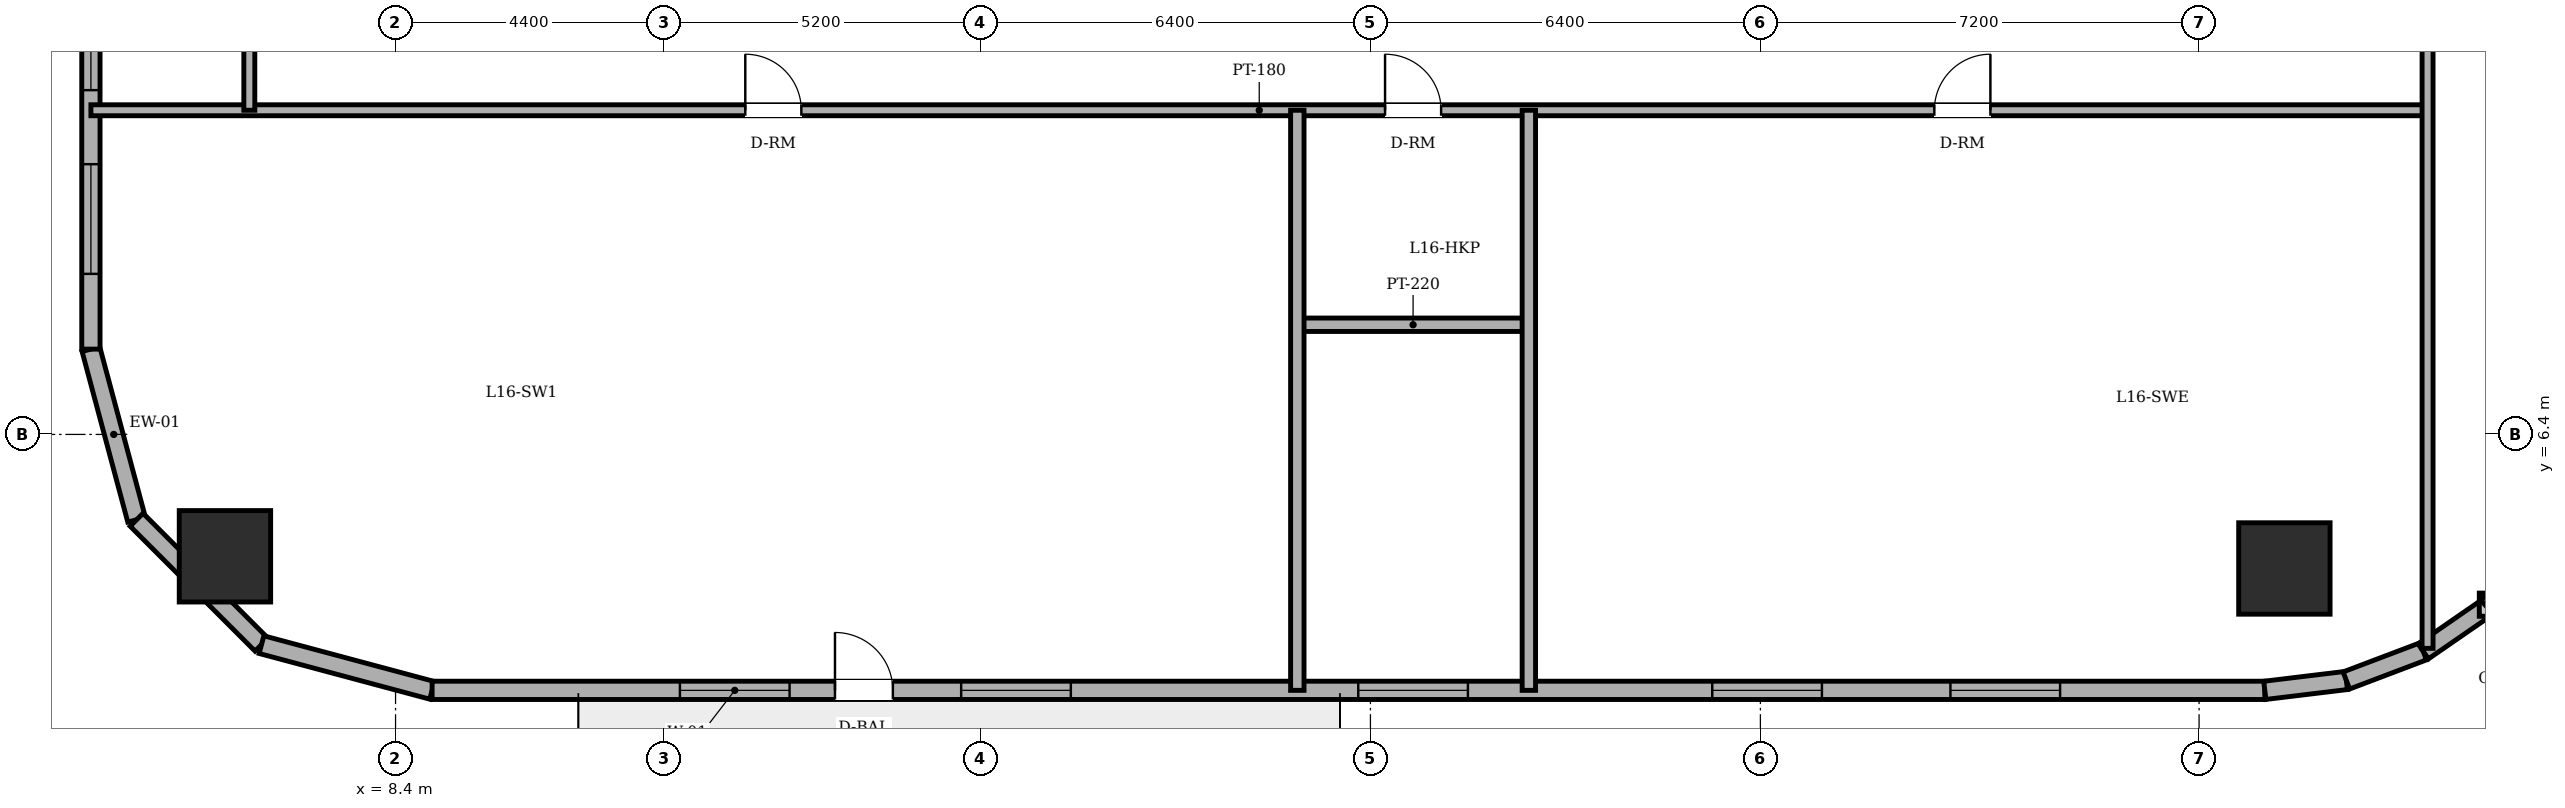
"""IFC4 building model, lengths in metres.
Left out: names, types, materials, properties, quantities, classifications, styles, units other than length and angle.
Written with IfcOpenShell. Run it as: python <this file> out.ifc"""

import sys

from ifc_helpers import new_model, si_unit, direction, frame, frame_2d, origin, origin_2d, place, context, subcontext, project, spatial, rectangle, circle, extrude, element, fill, save


model = new_model("IFC4")
c1 = context("Model", 3, precision=1e-05, world=origin(), true_north=direction((0.0, 1.0)))
c2 = subcontext(c1, "Body", "Model", "MODEL_VIEW")
j1 = project(units=[si_unit("LENGTHUNIT", "METRE"), si_unit("PLANEANGLEUNIT", "RADIAN")], contexts=[c1])
p1 = place(None, origin())
s1 = spatial("IfcSite", under=j1, at=p1, CompositionType="ELEMENT")
p2 = place(p1, origin())
s2 = spatial("IfcBuilding", under=s1, at=p2, CompositionType="ELEMENT")
p3 = place(p2, frame((0.0, 0.0, 61.2)))
s3 = spatial("IfcBuildingStorey", under=s2, at=p3, CompositionType="ELEMENT", Elevation=61.2)
for number, where, z_axis, x_axis in (
    (1, (5.6, 4.4, 0.0), (0.0, 0.0, 1.0), (1.0, 0.0, 0.0)),
    (2, (39.4, 4.2, 0.0), (0.0, 0.0, 1.0), (1.0, 0.0, 0.0)),
):
    element("IfcColumn", number, at=place(p3, frame(where, z_axis=z_axis, x_axis=x_axis)), inside=s3, PredefinedType="COLUMN", context=c2, shape_type="SweptSolid", body=[
        extrude(circle(Radius=0.75, at=origin_2d()), origin(), (0.0, 0.0, 1.0), 3.6),
    ])
p4 = place(p3, frame((3.4, 7.8, 0.0), z_axis=(0.0, 0.0, 1.0), x_axis=(0.258731875344, -0.96594917914, 0.0)))
e3 = element("IfcWall", 3, at=p4, inside=s3, PredefinedType="SOLIDWALL", context=c2, shape_type="SweptSolid", body=[
    extrude(rectangle(XDim=2.899, YDim=0.3, at=frame_2d((1.449, 0.0))), origin(), (0.0, 0.0, 1.0), 3.4),
])
p5 = place(p3, frame((4.15, 5.0, 0.0), z_axis=(0.0, 0.0, 1.0), x_axis=(0.707106781187, -0.707106781187, 0.0)))
e4 = element("IfcWall", 4, at=p5, inside=s3, PredefinedType="SOLIDWALL", context=c2, shape_type="SweptSolid", body=[
    extrude(rectangle(XDim=2.899, YDim=0.3, at=frame_2d((1.45, 0.0))), origin(), (0.0, 0.0, 1.0), 3.4),
])
p6 = place(p3, frame((6.2, 2.95, 0.0), z_axis=(0.0, 0.0, 1.0), x_axis=(0.96594917914, -0.258731875344, 0.0)))
e5 = element("IfcWall", 5, at=p6, inside=s3, PredefinedType="SOLIDWALL", context=c2, shape_type="SweptSolid", body=[
    extrude(rectangle(XDim=2.899, YDim=0.3, at=frame_2d((1.449, 0.0))), origin(), (0.0, 0.0, 1.0), 3.4),
])
p7 = place(p3, frame((9.0, 2.2, 0.0), z_axis=(0.0, 0.0, 1.0), x_axis=(1.0, 0.0, 0.0)))
e6 = element("IfcWall", 6, at=p7, inside=s3, PredefinedType="SOLIDWALL", context=c2, shape_type="SweptSolid", body=[
    extrude(rectangle(XDim=30.079, YDim=0.3, at=frame_2d((15.04, 0.0))), origin(), (0.0, 0.0, 1.0), 3.4),
])
p8 = place(p7, frame((6.612, 0.0, 0.0)))
e7 = element("IfcOpeningElement", 7, at=p8, cuts=e6, PredefinedType="OPENING", context=c2, shape_type="SweptSolid", body=[
    extrude(rectangle(XDim=0.95, YDim=2.2, at=frame_2d((0.475, 1.1))), frame((0.0, 0.16, 0.0), z_axis=(0.0, -1.0, 0.0), x_axis=(1.0, 0.0, 0.0)), (0.0, 0.0, 1.0), 0.32),
])
p9 = place(p7, frame((4.067, 0.0, 0.85)))
e8 = element("IfcOpeningElement", 8, at=p9, cuts=e6, PredefinedType="OPENING", context=c2, shape_type="SweptSolid", body=[
    extrude(rectangle(XDim=1.8, YDim=1.55, at=frame_2d((0.9, 0.775))), frame((0.0, 0.16, 0.0), z_axis=(0.0, -1.0, 0.0), x_axis=(1.0, 0.0, 0.0)), (0.0, 0.0, 1.0), 0.32),
])
p10 = place(p7, frame((8.683, 0.0, 0.85)))
e9 = element("IfcOpeningElement", 9, at=p10, cuts=e6, PredefinedType="OPENING", context=c2, shape_type="SweptSolid", body=[
    extrude(rectangle(XDim=1.8, YDim=1.55, at=frame_2d((0.9, 0.775))), frame((0.0, 0.16, 0.0), z_axis=(0.0, -1.0, 0.0), x_axis=(1.0, 0.0, 0.0)), (0.0, 0.0, 1.0), 0.32),
])
p11 = place(p7, frame((15.2, 0.0, 0.85)))
e10 = element("IfcOpeningElement", 10, at=p11, cuts=e6, PredefinedType="OPENING", context=c2, shape_type="SweptSolid", body=[
    extrude(rectangle(XDim=1.8, YDim=1.55, at=frame_2d((0.9, 0.775))), frame((0.0, 0.16, 0.0), z_axis=(0.0, -1.0, 0.0), x_axis=(1.0, 0.0, 0.0)), (0.0, 0.0, 1.0), 0.32),
])
p12 = place(p7, frame((21.01, 0.0, 0.85)))
e11 = element("IfcOpeningElement", 11, at=p12, cuts=e6, PredefinedType="OPENING", context=c2, shape_type="SweptSolid", body=[
    extrude(rectangle(XDim=1.8, YDim=1.55, at=frame_2d((0.9, 0.775))), frame((0.0, 0.16, 0.0), z_axis=(0.0, -1.0, 0.0), x_axis=(1.0, 0.0, 0.0)), (0.0, 0.0, 1.0), 0.32),
])
p13 = place(p7, frame((24.919, 0.0, 0.85)))
e12 = element("IfcOpeningElement", 12, at=p13, cuts=e6, PredefinedType="OPENING", context=c2, shape_type="SweptSolid", body=[
    extrude(rectangle(XDim=1.8, YDim=1.55, at=frame_2d((0.9, 0.775))), frame((0.0, 0.16, 0.0), z_axis=(0.0, -1.0, 0.0), x_axis=(1.0, 0.0, 0.0)), (0.0, 0.0, 1.0), 0.32),
])
p14 = place(p3, frame((39.079, 2.2, 0.0), z_axis=(0.0, 0.0, 1.0), x_axis=(0.992739027259, 0.120288086515, 0.0)))
e13 = element("IfcWall", 13, at=p14, inside=s3, PredefinedType="SOLIDWALL", context=c2, shape_type="SweptSolid", body=[
    extrude(rectangle(XDim=1.348, YDim=0.3, at=frame_2d((0.674, 0.0))), origin(), (0.0, 0.0, 1.0), 3.4),
])
p15 = place(p3, frame((40.417, 2.362, 0.0), z_axis=(0.0, 0.0, 1.0), x_axis=(0.935156721165, 0.354234254216, 0.0)))
e14 = element("IfcWall", 14, at=p15, inside=s3, PredefinedType="SOLIDWALL", context=c2, shape_type="SweptSolid", body=[
    extrude(rectangle(XDim=1.349, YDim=0.3, at=frame_2d((0.675, 0.0))), origin(), (0.0, 0.0, 1.0), 3.4),
])
p16 = place(p3, frame((41.679, 2.84, 0.0), z_axis=(0.0, 0.0, 1.0), x_axis=(0.823116500192, 0.567872544777, 0.0)))
e15 = element("IfcWall", 15, at=p16, inside=s3, PredefinedType="SOLIDWALL", context=c2, shape_type="SweptSolid", body=[
    extrude(rectangle(XDim=1.349, YDim=0.3, at=frame_2d((0.674, 0.0))), origin(), (0.0, 0.0, 1.0), 3.4),
])
p17 = place(p3, frame((3.4, 40.2, 0.0), z_axis=(0.0, 0.0, 1.0), x_axis=(0.0, -1.0, 0.0)))
e16 = element("IfcWall", 16, at=p17, inside=s3, PredefinedType="SOLIDWALL", context=c2, shape_type="SweptSolid", body=[
    extrude(rectangle(XDim=32.4, YDim=0.3, at=frame_2d((16.2, 0.0))), origin(), (0.0, 0.0, 1.0), 3.4),
])
p18 = place(p17, frame((1.235, 0.0, 0.85)))
e17 = element("IfcOpeningElement", 17, at=p18, cuts=e16, PredefinedType="OPENING", context=c2, shape_type="SweptSolid", body=[
    extrude(rectangle(XDim=1.8, YDim=1.55, at=frame_2d((0.9, 0.775))), frame((0.0, 0.16, 0.0), z_axis=(0.0, -1.0, 0.0), x_axis=(1.0, 0.0, 0.0)), (0.0, 0.0, 1.0), 0.32),
])
p19 = place(p17, frame((4.25, 0.0, 0.85)))
e18 = element("IfcOpeningElement", 18, at=p19, cuts=e16, PredefinedType="OPENING", context=c2, shape_type="SweptSolid", body=[
    extrude(rectangle(XDim=1.8, YDim=1.55, at=frame_2d((0.9, 0.775))), frame((0.0, 0.16, 0.0), z_axis=(0.0, -1.0, 0.0), x_axis=(1.0, 0.0, 0.0)), (0.0, 0.0, 1.0), 0.32),
])
p20 = place(p17, frame((12.027, 0.0, 0.85)))
e19 = element("IfcOpeningElement", 19, at=p20, cuts=e16, PredefinedType="OPENING", context=c2, shape_type="SweptSolid", body=[
    extrude(rectangle(XDim=1.8, YDim=1.55, at=frame_2d((0.9, 0.775))), frame((0.0, 0.16, 0.0), z_axis=(0.0, -1.0, 0.0), x_axis=(1.0, 0.0, 0.0)), (0.0, 0.0, 1.0), 0.32),
])
p21 = place(p17, frame((18.573, 0.0, 0.85)))
e20 = element("IfcOpeningElement", 20, at=p21, cuts=e16, PredefinedType="OPENING", context=c2, shape_type="SweptSolid", body=[
    extrude(rectangle(XDim=1.8, YDim=1.55, at=frame_2d((0.9, 0.775))), frame((0.0, 0.16, 0.0), z_axis=(0.0, -1.0, 0.0), x_axis=(1.0, 0.0, 0.0)), (0.0, 0.0, 1.0), 0.32),
])
p22 = place(p17, frame((26.35, 0.0, 0.85)))
e21 = element("IfcOpeningElement", 21, at=p22, cuts=e16, PredefinedType="OPENING", context=c2, shape_type="SweptSolid", body=[
    extrude(rectangle(XDim=1.8, YDim=1.55, at=frame_2d((0.9, 0.775))), frame((0.0, 0.16, 0.0), z_axis=(0.0, -1.0, 0.0), x_axis=(1.0, 0.0, 0.0)), (0.0, 0.0, 1.0), 0.32),
])
p23 = place(p17, frame((29.365, 0.0, 0.85)))
e22 = element("IfcOpeningElement", 22, at=p23, cuts=e16, PredefinedType="OPENING", context=c2, shape_type="SweptSolid", body=[
    extrude(rectangle(XDim=1.8, YDim=1.55, at=frame_2d((0.9, 0.775))), frame((0.0, 0.16, 0.0), z_axis=(0.0, -1.0, 0.0), x_axis=(1.0, 0.0, 0.0)), (0.0, 0.0, 1.0), 0.32),
])
p24 = place(p3, frame((23.2, 8.2, 0.0), z_axis=(0.0, 0.0, 1.0), x_axis=(1.0, 0.0, 0.0)))
e23 = element("IfcWall", 23, at=p24, inside=s3, PredefinedType="PARTITIONING", context=c2, shape_type="SweptSolid", body=[
    extrude(rectangle(XDim=3.8, YDim=0.22, at=frame_2d((1.9, 0.0))), origin(), (0.0, 0.0, 1.0), 3.4),
])
p25 = place(p3, frame((3.4, 11.72, 0.0), z_axis=(0.0, 0.0, 1.0), x_axis=(1.0, 0.0, 0.0)))
e24 = element("IfcWall", 24, at=p25, inside=s3, PredefinedType="PARTITIONING", context=c2, shape_type="SweptSolid", body=[
    extrude(rectangle(XDim=38.35, YDim=0.18, at=frame_2d((19.175, 0.0))), origin(), (0.0, 0.0, 1.0), 3.4),
])
p26 = place(p25, frame((21.24, 0.0, 0.0)))
e25 = element("IfcOpeningElement", 25, at=p26, cuts=e24, PredefinedType="OPENING", context=c2, shape_type="SweptSolid", body=[
    extrude(rectangle(XDim=0.92, YDim=2.1, at=frame_2d((0.46, 1.05))), frame((0.0, 0.1, 0.0), z_axis=(0.0, -1.0, 0.0), x_axis=(1.0, 0.0, 0.0)), (0.0, 0.0, 1.0), 0.2),
])
p27 = place(p25, frame((10.74, 0.0, 0.0)))
e26 = element("IfcOpeningElement", 26, at=p27, cuts=e24, PredefinedType="OPENING", context=c2, shape_type="SweptSolid", body=[
    extrude(rectangle(XDim=0.92, YDim=2.1, at=frame_2d((0.46, 1.05))), frame((0.0, 0.1, 0.0), z_axis=(0.0, -1.0, 0.0), x_axis=(1.0, 0.0, 0.0)), (0.0, 0.0, 1.0), 0.2),
])
p28 = place(p25, frame((30.255, 0.0, 0.0)))
e27 = element("IfcOpeningElement", 27, at=p28, cuts=e24, PredefinedType="OPENING", context=c2, shape_type="SweptSolid", body=[
    extrude(rectangle(XDim=0.92, YDim=2.1, at=frame_2d((0.46, 1.05))), frame((0.0, 0.1, 0.0), z_axis=(0.0, -1.0, 0.0), x_axis=(1.0, 0.0, 0.0)), (0.0, 0.0, 1.0), 0.2),
])
p29 = place(p3, frame((6.0, 11.72, 0.0), z_axis=(0.0, 0.0, 1.0), x_axis=(0.0, 1.0, 0.0)))
e28 = element("IfcWall", 28, at=p29, inside=s3, PredefinedType="PARTITIONING", context=c2, shape_type="SweptSolid", body=[
    extrude(rectangle(XDim=2.46, YDim=0.18, at=frame_2d((1.23, 0.0))), origin(), (0.0, 0.0, 1.0), 3.4),
])
for number, where, z_axis, x_axis in (
    (29, (23.2, 2.2, 0.0), (0.0, 0.0, 1.0), (0.0, 1.0, 0.0)),
    (30, (27.0, 2.2, 0.0), (0.0, 0.0, 1.0), (0.0, 1.0, 0.0)),
):
    element("IfcWall", number, at=place(p3, frame(where, z_axis=z_axis, x_axis=x_axis)), inside=s3, PredefinedType="PARTITIONING", context=c2, shape_type="SweptSolid", body=[
        extrude(rectangle(XDim=9.52, YDim=0.22, at=frame_2d((4.76, 0.0))), origin(), (0.0, 0.0, 1.0), 3.4),
    ])
p30 = place(p3, frame((41.75, 2.889, 0.0), z_axis=(0.0, 0.0, 1.0), x_axis=(0.0, 1.0, 0.0)))
e31 = element("IfcWall", 31, at=p30, inside=s3, PredefinedType="PARTITIONING", context=c2, shape_type="SweptSolid", body=[
    extrude(rectangle(XDim=19.931, YDim=0.18, at=frame_2d((9.966, 0.0))), origin(), (0.0, 0.0, 1.0), 2.782),
])
p31 = place(p30, frame((13.661, 0.0, 0.0)))
e32 = element("IfcOpeningElement", 32, at=p31, cuts=e31, PredefinedType="OPENING", context=c2, shape_type="SweptSolid", body=[
    extrude(rectangle(XDim=0.92, YDim=2.1, at=frame_2d((0.46, 1.05))), frame((0.0, 0.1, 0.0), z_axis=(0.0, -1.0, 0.0), x_axis=(1.0, 0.0, 0.0)), (0.0, 0.0, 1.0), 0.2),
])
p32 = place(p8, origin())
e33 = element("IfcDoor", 33, at=p32, inside=s3, OperationType="SINGLE_SWING_LEFT", PredefinedType="DOOR", context=c2, shape_type="SweptSolid", body=[
    extrude(rectangle(XDim=0.95, YDim=2.2, at=frame_2d((0.475, 1.1))), frame((0.0, 0.025, 0.0), z_axis=(0.0, -1.0, 0.0), x_axis=(1.0, 0.0, 0.0)), (0.0, 0.0, 1.0), 0.05),
])
fill(e7, e33)
p33 = place(p9, origin())
e34 = element("IfcWindow", 34, at=p33, inside=s3, PartitioningType="DOUBLE_PANEL_VERTICAL", PredefinedType="WINDOW", context=c2, shape_type="SweptSolid", body=[
    extrude(rectangle(XDim=1.8, YDim=1.55, at=frame_2d((0.9, 0.775))), frame((0.0, 0.03, 0.0), z_axis=(0.0, -1.0, 0.0), x_axis=(1.0, 0.0, 0.0)), (0.0, 0.0, 1.0), 0.06),
])
fill(e8, e34)
p34 = place(p10, origin())
e35 = element("IfcWindow", 35, at=p34, inside=s3, PartitioningType="DOUBLE_PANEL_VERTICAL", PredefinedType="WINDOW", context=c2, shape_type="SweptSolid", body=[
    extrude(rectangle(XDim=1.8, YDim=1.55, at=frame_2d((0.9, 0.775))), frame((0.0, 0.03, 0.0), z_axis=(0.0, -1.0, 0.0), x_axis=(1.0, 0.0, 0.0)), (0.0, 0.0, 1.0), 0.06),
])
fill(e9, e35)
p35 = place(p11, origin())
e36 = element("IfcWindow", 36, at=p35, inside=s3, PartitioningType="DOUBLE_PANEL_VERTICAL", PredefinedType="WINDOW", context=c2, shape_type="SweptSolid", body=[
    extrude(rectangle(XDim=1.8, YDim=1.55, at=frame_2d((0.9, 0.775))), frame((0.0, 0.03, 0.0), z_axis=(0.0, -1.0, 0.0), x_axis=(1.0, 0.0, 0.0)), (0.0, 0.0, 1.0), 0.06),
])
fill(e10, e36)
p36 = place(p12, origin())
e37 = element("IfcWindow", 37, at=p36, inside=s3, PartitioningType="DOUBLE_PANEL_VERTICAL", PredefinedType="WINDOW", context=c2, shape_type="SweptSolid", body=[
    extrude(rectangle(XDim=1.8, YDim=1.55, at=frame_2d((0.9, 0.775))), frame((0.0, 0.03, 0.0), z_axis=(0.0, -1.0, 0.0), x_axis=(1.0, 0.0, 0.0)), (0.0, 0.0, 1.0), 0.06),
])
fill(e11, e37)
p37 = place(p13, origin())
e38 = element("IfcWindow", 38, at=p37, inside=s3, PartitioningType="DOUBLE_PANEL_VERTICAL", PredefinedType="WINDOW", context=c2, shape_type="SweptSolid", body=[
    extrude(rectangle(XDim=1.8, YDim=1.55, at=frame_2d((0.9, 0.775))), frame((0.0, 0.03, 0.0), z_axis=(0.0, -1.0, 0.0), x_axis=(1.0, 0.0, 0.0)), (0.0, 0.0, 1.0), 0.06),
])
fill(e12, e38)
p38 = place(p22, origin())
e39 = element("IfcWindow", 39, at=p38, inside=s3, PartitioningType="DOUBLE_PANEL_VERTICAL", PredefinedType="WINDOW", context=c2, shape_type="SweptSolid", body=[
    extrude(rectangle(XDim=1.8, YDim=1.55, at=frame_2d((0.9, 0.775))), frame((0.0, 0.03, 0.0), z_axis=(0.0, -1.0, 0.0), x_axis=(1.0, 0.0, 0.0)), (0.0, 0.0, 1.0), 0.06),
])
fill(e21, e39)
p39 = place(p23, origin())
e40 = element("IfcWindow", 40, at=p39, inside=s3, PartitioningType="DOUBLE_PANEL_VERTICAL", PredefinedType="WINDOW", context=c2, shape_type="SweptSolid", body=[
    extrude(rectangle(XDim=1.8, YDim=1.55, at=frame_2d((0.9, 0.775))), frame((0.0, 0.03, 0.0), z_axis=(0.0, -1.0, 0.0), x_axis=(1.0, 0.0, 0.0)), (0.0, 0.0, 1.0), 0.06),
])
fill(e22, e40)
p40 = place(p26, origin())
e41 = element("IfcDoor", 41, at=p40, inside=s3, OperationType="SINGLE_SWING_LEFT", PredefinedType="DOOR", context=c2, shape_type="SweptSolid", body=[
    extrude(rectangle(XDim=0.92, YDim=2.1, at=frame_2d((0.46, 1.05))), frame((0.0, 0.025, 0.0), z_axis=(0.0, -1.0, 0.0), x_axis=(1.0, 0.0, 0.0)), (0.0, 0.0, 1.0), 0.05),
])
fill(e25, e41)
p41 = place(p27, origin())
e42 = element("IfcDoor", 42, at=p41, inside=s3, OperationType="SINGLE_SWING_LEFT", PredefinedType="DOOR", context=c2, shape_type="SweptSolid", body=[
    extrude(rectangle(XDim=0.92, YDim=2.1, at=frame_2d((0.46, 1.05))), frame((0.0, 0.025, 0.0), z_axis=(0.0, -1.0, 0.0), x_axis=(1.0, 0.0, 0.0)), (0.0, 0.0, 1.0), 0.05),
])
fill(e26, e42)
p42 = place(p28, origin())
e43 = element("IfcDoor", 43, at=p42, inside=s3, OperationType="SINGLE_SWING_RIGHT", PredefinedType="DOOR", context=c2, shape_type="SweptSolid", body=[
    extrude(rectangle(XDim=0.92, YDim=2.1, at=frame_2d((0.46, 1.05))), frame((0.0, 0.025, 0.0), z_axis=(0.0, -1.0, 0.0), x_axis=(1.0, 0.0, 0.0)), (0.0, 0.0, 1.0), 0.05),
])
fill(e27, e43)
save(model, sys.argv[1])
